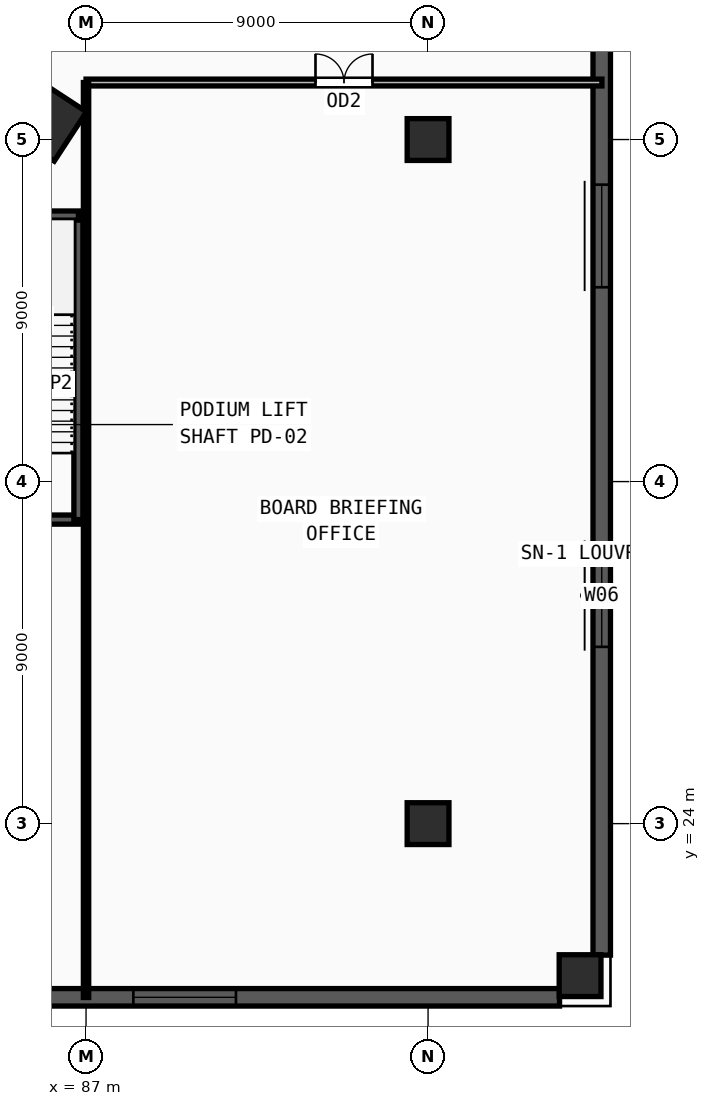
"""IFC4 building model, lengths in metres.
Left out: names, types, materials, properties, quantities, classifications, styles, units other than length and angle.
Written with IfcOpenShell. Run it as: python <this file> out.ifc"""

import sys

from ifc_helpers import new_model, si_unit, direction, frame, frame_2d, origin, origin_2d, place, context, subcontext, project, spatial, rectangle, extrude, source, transform, mapped, element, fill, save


model = new_model("IFC4")
c1 = context("Model", 3, precision=1e-05, world=origin(), true_north=direction((0.0, 1.0)))
c2 = subcontext(c1, "Body", "Model", "MODEL_VIEW")
j1 = project(units=[si_unit("LENGTHUNIT", "METRE"), si_unit("PLANEANGLEUNIT", "RADIAN")], contexts=[c1])
p1 = place(None, origin())
s1 = spatial("IfcSite", under=j1, at=p1, CompositionType="ELEMENT")
p2 = place(p1, origin())
s2 = spatial("IfcBuilding", under=s1, at=p2, CompositionType="ELEMENT")
p3 = place(p2, frame((0.0, 0.0, 14.4)))
s3 = spatial("IfcBuildingStorey", under=s2, at=p3, CompositionType="ELEMENT", Elevation=14.4)
m1 = source(origin(), c2, "Body", "SweptSolid", [
    extrude(rectangle(XDim=1.55, YDim=1.25, at=origin_2d()), origin(), (0.0, 0.0, 1.0), 4.5),
])
p4 = place(p3, frame((86.064, 42.423, 0.0), z_axis=(0.0, 0.0, 1.0), x_axis=(0.546978918409, 0.837146380758, 0.0)))
e1 = element("IfcColumn", 1, at=p4, inside=s3, PredefinedType="COLUMN", context=c2, shape_type="MappedRepresentation", body=[
    mapped(m1, transform((0.0, 0.0, 0.0), x_axis=(1.0, 0.0, 0.0), y_axis=(0.0, 1.0, 0.0), z_axis=(0.0, 0.0, 1.0), scale=1.0)),
])
m2 = source(origin(), c2, "Body", "SweptSolid", [
    extrude(rectangle(XDim=1.1, YDim=1.1, at=origin_2d()), origin(), (0.0, 0.0, 1.0), 4.5),
])
for number, where, z_axis, x_axis in (
    (2, (96.0, 24.0, 0.0), (0.0, 0.0, 1.0), (1.0, 0.0, 0.0)),
    (3, (96.0, 42.0, 0.0), (0.0, 0.0, 1.0), (1.0, 0.0, 0.0)),
    (4, (100.0, 20.0, 0.0), (0.0, 0.0, 1.0), (1.0, 0.0, 0.0)),
):
    element("IfcColumn", number, at=place(p3, frame(where, z_axis=z_axis, x_axis=x_axis)), inside=s3, PredefinedType="COLUMN", context=c2, shape_type="MappedRepresentation", body=[
        mapped(m2, transform((0.0, 0.0, 0.0), x_axis=(1.0, 0.0, 0.0), y_axis=(0.0, 1.0, 0.0), z_axis=(0.0, 0.0, 1.0), scale=1.0)),
    ])
p5 = place(p3, frame((100.57, 20.54, 0.0), z_axis=(0.0, 0.0, 1.0), x_axis=(0.0, 1.0, 0.0)))
e5 = element("IfcWall", 5, at=p5, inside=s3, PredefinedType="SOLIDWALL", context=c2, shape_type="SweptSolid", body=[
    extrude(rectangle(XDim=66.23, YDim=0.46, at=frame_2d((33.115, 0.0))), origin(), (0.0, 0.0, 1.0), 4.25),
])
m3 = source(origin(), c2, "Body", "SweptSolid", [
    extrude(rectangle(XDim=2.7, YDim=2.35, at=frame_2d((1.35, 1.175))), frame((0.0, 0.24, 0.0), z_axis=(0.0, -1.0, 0.0), x_axis=(1.0, 0.0, 0.0)), (0.0, 0.0, 1.0), 0.48),
])
p6 = place(p5, frame((8.111, 0.0, 0.55)))
e6 = element("IfcOpeningElement", 6, at=p6, cuts=e5, PredefinedType="OPENING", context=c2, shape_type="MappedRepresentation", body=[
    mapped(m3, transform((0.0, 0.0, 0.0), x_axis=(1.0, 0.0, 0.0), y_axis=(0.0, 1.0, 0.0), z_axis=(0.0, 0.0, 1.0), scale=1.0)),
])
p7 = place(p5, frame((17.573, 0.0, 0.55)))
e7 = element("IfcOpeningElement", 7, at=p7, cuts=e5, PredefinedType="OPENING", context=c2, shape_type="MappedRepresentation", body=[
    mapped(m3, transform((0.0, 0.0, 0.0), x_axis=(1.0, 0.0, 0.0), y_axis=(0.0, 1.0, 0.0), z_axis=(0.0, 0.0, 1.0), scale=1.0)),
])
p8 = place(p5, frame((27.034, 0.0, 0.55)))
e8 = element("IfcOpeningElement", 8, at=p8, cuts=e5, PredefinedType="OPENING", context=c2, shape_type="MappedRepresentation", body=[
    mapped(m3, transform((0.0, 0.0, 0.0), x_axis=(1.0, 0.0, 0.0), y_axis=(0.0, 1.0, 0.0), z_axis=(0.0, 0.0, 1.0), scale=1.0)),
])
p9 = place(p5, frame((36.496, 0.0, 0.55)))
e9 = element("IfcOpeningElement", 9, at=p9, cuts=e5, PredefinedType="OPENING", context=c2, shape_type="MappedRepresentation", body=[
    mapped(m3, transform((0.0, 0.0, 0.0), x_axis=(1.0, 0.0, 0.0), y_axis=(0.0, 1.0, 0.0), z_axis=(0.0, 0.0, 1.0), scale=1.0)),
])
p10 = place(p5, frame((55.419, 0.0, 0.55)))
e10 = element("IfcOpeningElement", 10, at=p10, cuts=e5, PredefinedType="OPENING", context=c2, shape_type="MappedRepresentation", body=[
    mapped(m3, transform((0.0, 0.0, 0.0), x_axis=(1.0, 0.0, 0.0), y_axis=(0.0, 1.0, 0.0), z_axis=(0.0, 0.0, 1.0), scale=1.0)),
])
p11 = place(p3, frame((20.54, 19.43, 0.0), z_axis=(0.0, 0.0, 1.0), x_axis=(1.0, 0.0, 0.0)))
e11 = element("IfcWall", 11, at=p11, inside=s3, PredefinedType="SOLIDWALL", context=c2, shape_type="SweptSolid", body=[
    extrude(rectangle(XDim=78.92, YDim=0.46, at=frame_2d((39.46, 0.0))), origin(), (0.0, 0.0, 1.0), 4.25),
])
p12 = place(p11, frame((18.38, 0.0, 0.55)))
e12 = element("IfcOpeningElement", 12, at=p12, cuts=e11, PredefinedType="OPENING", context=c2, shape_type="MappedRepresentation", body=[
    mapped(m3, transform((0.0, 0.0, 0.0), x_axis=(1.0, 0.0, 0.0), y_axis=(0.0, 1.0, 0.0), z_axis=(0.0, 0.0, 1.0), scale=1.0)),
])
p13 = place(p11, frame((57.84, 0.0, 0.55)))
e13 = element("IfcOpeningElement", 13, at=p13, cuts=e11, PredefinedType="OPENING", context=c2, shape_type="MappedRepresentation", body=[
    mapped(m3, transform((0.0, 0.0, 0.0), x_axis=(1.0, 0.0, 0.0), y_axis=(0.0, 1.0, 0.0), z_axis=(0.0, 0.0, 1.0), scale=1.0)),
])
p14 = place(p11, frame((67.705, 0.0, 0.55)))
e14 = element("IfcOpeningElement", 14, at=p14, cuts=e11, PredefinedType="OPENING", context=c2, shape_type="MappedRepresentation", body=[
    mapped(m3, transform((0.0, 0.0, 0.0), x_axis=(1.0, 0.0, 0.0), y_axis=(0.0, 1.0, 0.0), z_axis=(0.0, 0.0, 1.0), scale=1.0)),
])
p15 = place(p3, frame((83.16, 32.0, 0.0), z_axis=(0.0, 0.0, 1.0), x_axis=(1.0, 0.0, 0.0)))
e15 = element("IfcWall", 15, at=p15, inside=s3, PredefinedType="SOLIDWALL", context=c2, shape_type="SweptSolid", body=[
    extrude(rectangle(XDim=3.64, YDim=0.24, at=frame_2d((1.82, 0.0))), origin(), (0.0, 0.0, 1.0), 4.25),
])
m4 = source(origin(), c2, "Body", "SweptSolid", [
    extrude(rectangle(XDim=1.2, YDim=2.2, at=frame_2d((0.6, 1.1))), frame((0.0, 0.13, 0.0), z_axis=(0.0, -1.0, 0.0), x_axis=(1.0, 0.0, 0.0)), (0.0, 0.0, 1.0), 0.26),
])
p16 = place(p15, frame((1.22, 0.0, 0.0)))
e16 = element("IfcOpeningElement", 16, at=p16, cuts=e15, PredefinedType="OPENING", context=c2, shape_type="MappedRepresentation", body=[
    mapped(m4, transform((0.0, 0.0, 0.0), x_axis=(1.0, 0.0, 0.0), y_axis=(0.0, 1.0, 0.0), z_axis=(0.0, 0.0, 1.0), scale=1.0)),
])
p17 = place(p3, frame((86.8, 32.0, 0.0), z_axis=(0.0, 0.0, 1.0), x_axis=(0.0, 1.0, 0.0)))
e17 = element("IfcWall", 17, at=p17, inside=s3, PredefinedType="SOLIDWALL", context=c2, shape_type="SweptSolid", body=[
    extrude(rectangle(XDim=8.0, YDim=0.24, at=frame_2d((4.0, 0.0))), origin(), (0.0, 0.0, 1.0), 4.25),
])
p18 = place(p3, frame((86.8, 40.0, 0.0), z_axis=(0.0, 0.0, 1.0), x_axis=(-1.0, 0.0, 0.0)))
e18 = element("IfcWall", 18, at=p18, inside=s3, PredefinedType="SOLIDWALL", context=c2, shape_type="SweptSolid", body=[
    extrude(rectangle(XDim=3.64, YDim=0.24, at=frame_2d((1.82, 0.0))), origin(), (0.0, 0.0, 1.0), 4.25),
])
p19 = place(p3, frame((87.0, 43.5, 0.0), z_axis=(0.0, 0.0, 1.0), x_axis=(1.0, 0.0, 0.0)))
e19 = element("IfcWall", 19, at=p19, inside=s3, PredefinedType="PARTITIONING", context=c2, shape_type="SweptSolid", body=[
    extrude(rectangle(XDim=13.575, YDim=0.18, at=frame_2d((6.788, 0.0))), origin(), (0.0, 0.0, 1.0), 4.25),
])
m5 = source(origin(), c2, "Body", "SweptSolid", [
    extrude(rectangle(XDim=1.5, YDim=2.2, at=frame_2d((0.75, 1.1))), frame((0.0, 0.1, 0.0), z_axis=(0.0, -1.0, 0.0), x_axis=(1.0, 0.0, 0.0)), (0.0, 0.0, 1.0), 0.2),
])
p20 = place(p19, frame((6.038, 0.0, 0.0)))
e20 = element("IfcOpeningElement", 20, at=p20, cuts=e19, PredefinedType="OPENING", context=c2, shape_type="MappedRepresentation", body=[
    mapped(m5, transform((0.0, 0.0, 0.0), x_axis=(1.0, 0.0, 0.0), y_axis=(0.0, 1.0, 0.0), z_axis=(0.0, 0.0, 1.0), scale=1.0)),
])
p21 = place(p3, frame((87.0, 19.425, 0.0), z_axis=(0.0, 0.0, 1.0), x_axis=(0.0, 1.0, 0.0)))
e21 = element("IfcWall", 21, at=p21, inside=s3, PredefinedType="PARTITIONING", context=c2, shape_type="SweptSolid", body=[
    extrude(rectangle(XDim=24.075, YDim=0.14, at=frame_2d((12.038, 0.0))), origin(), (0.0, 0.0, 1.0), 4.25),
])
m6 = source(origin(), c2, "Body", "SweptSolid", [
    extrude(rectangle(XDim=2.7, YDim=2.35, at=frame_2d((1.35, 1.175))), frame((0.0, 0.03, 0.0), z_axis=(0.0, -1.0, 0.0), x_axis=(1.0, 0.0, 0.0)), (0.0, 0.0, 1.0), 0.06),
])
p22 = place(p6, origin())
e22 = element("IfcWindow", 22, at=p22, inside=s3, PartitioningType="TRIPLE_PANEL_VERTICAL", PredefinedType="WINDOW", context=c2, shape_type="MappedRepresentation", body=[
    mapped(m6, transform((0.0, 0.0, 0.0), x_axis=(1.0, 0.0, 0.0), y_axis=(0.0, 1.0, 0.0), z_axis=(0.0, 0.0, 1.0), scale=1.0)),
])
fill(e6, e22)
p23 = place(p7, origin())
e23 = element("IfcWindow", 23, at=p23, inside=s3, PartitioningType="TRIPLE_PANEL_VERTICAL", PredefinedType="WINDOW", context=c2, shape_type="MappedRepresentation", body=[
    mapped(m6, transform((0.0, 0.0, 0.0), x_axis=(1.0, 0.0, 0.0), y_axis=(0.0, 1.0, 0.0), z_axis=(0.0, 0.0, 1.0), scale=1.0)),
])
fill(e7, e23)
p24 = place(p14, origin())
e24 = element("IfcWindow", 24, at=p24, inside=s3, PartitioningType="TRIPLE_PANEL_VERTICAL", PredefinedType="WINDOW", context=c2, shape_type="MappedRepresentation", body=[
    mapped(m6, transform((0.0, 0.0, 0.0), x_axis=(1.0, 0.0, 0.0), y_axis=(0.0, 1.0, 0.0), z_axis=(0.0, 0.0, 1.0), scale=1.0)),
])
fill(e14, e24)
m7 = source(origin(), c2, "Body", "SweptSolid", [
    extrude(rectangle(XDim=1.5, YDim=2.2, at=frame_2d((0.75, 1.1))), frame((0.0, 0.025, 0.0), z_axis=(0.0, -1.0, 0.0), x_axis=(1.0, 0.0, 0.0)), (0.0, 0.0, 1.0), 0.05),
])
p25 = place(p20, origin())
e25 = element("IfcDoor", 25, at=p25, inside=s3, OperationType="DOUBLE_DOOR_SINGLE_SWING", PredefinedType="DOOR", context=c2, shape_type="MappedRepresentation", body=[
    mapped(m7, transform((0.0, 0.0, 0.0), x_axis=(1.0, 0.0, 0.0), y_axis=(0.0, 1.0, 0.0), z_axis=(0.0, 0.0, 1.0), scale=1.0)),
])
fill(e20, e25)
save(model, sys.argv[1])
